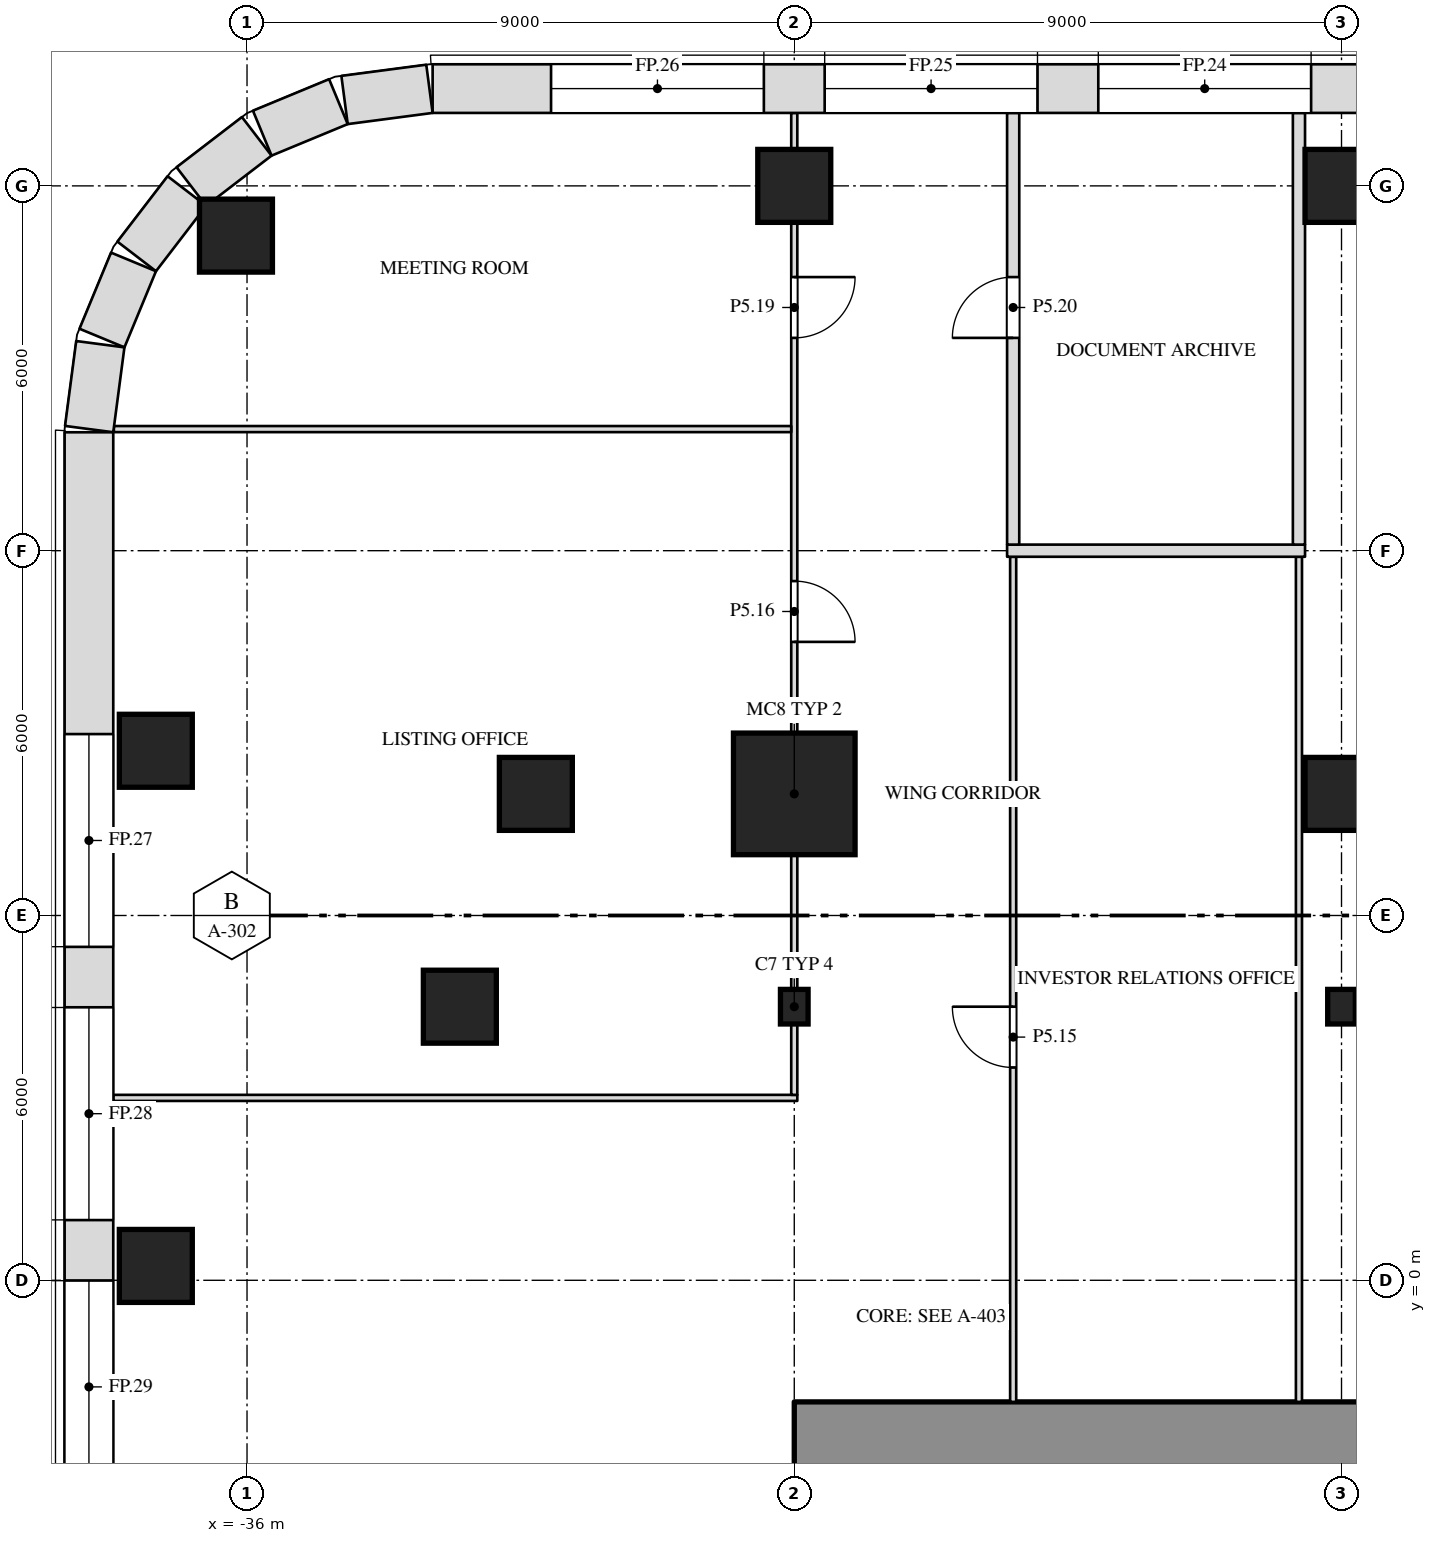
"""IFC4 building model, lengths in metres.
Left out: names, types, materials, properties, quantities, classifications, styles, units other than length and angle.
Written with IfcOpenShell. Run it as: python <this file> out.ifc"""

import sys

from ifc_helpers import new_model, si_unit, direction, frame, frame_2d, origin, origin_2d, place, context, subcontext, project, spatial, rectangle, i_section, extrude, element, fill, save


model = new_model("IFC4")
c1 = context("Model", 3, precision=1e-05, world=origin(), true_north=direction((0.0, 1.0)))
c2 = subcontext(c1, "Body", "Model", "MODEL_VIEW")
j1 = project(units=[si_unit("LENGTHUNIT", "METRE"), si_unit("PLANEANGLEUNIT", "RADIAN")], contexts=[c1])
p1 = place(None, origin())
s1 = spatial("IfcSite", under=j1, at=p1, CompositionType="ELEMENT")
p2 = place(p1, origin())
s2 = spatial("IfcBuilding", under=s1, at=p2, CompositionType="ELEMENT")
p3 = place(p2, frame((0.0, 0.0, 33.0)))
s3 = spatial("IfcBuildingStorey", under=s2, at=p3, CompositionType="ELEMENT", Elevation=33.0)
for number, where, z_axis, x_axis in (
    (1, (-37.5, 0.236, 0.0), (0.0, 0.0, 1.0), (1.0, 0.0, 0.0)),
    (2, (-32.5, 4.5, 0.0), (0.0, 0.0, 1.0), (1.0, 0.0, 0.0)),
):
    element("IfcColumn", number, at=place(p3, frame(where, z_axis=z_axis, x_axis=x_axis)), inside=s3, PredefinedType="COLUMN", context=c2, shape_type="SweptSolid", body=[
        extrude(rectangle(XDim=1.2, YDim=1.2, at=origin_2d()), origin(), (0.0, 0.0, 1.0), 6.0),
    ])
for number, where, z_axis, x_axis in (
    (3, (-27.0, 4.5, 0.0), (0.0, 0.0, 1.0), (1.0, 0.0, 0.0)),
    (4, (-18.0, 4.5, 0.0), (0.0, 0.0, 1.0), (1.0, 0.0, 0.0)),
):
    element("IfcColumn", number, at=place(p3, frame(where, z_axis=z_axis, x_axis=x_axis)), inside=s3, PredefinedType="COLUMN", context=c2, shape_type="SweptSolid", body=[
        extrude(i_section(OverallWidth=0.455, OverallDepth=0.569, WebThickness=0.078, FlangeThickness=0.125, at=origin_2d()), origin(), (0.0, 0.0, 1.0), 6.0),
    ])
p4 = place(p3, frame((-31.25, 8.0, 0.0), z_axis=(0.0, 0.0, 1.0), x_axis=(1.0, 0.0, 0.0)))
e5 = element("IfcColumn", 5, at=p4, inside=s3, PredefinedType="COLUMN", context=c2, shape_type="SweptSolid", body=[
    extrude(rectangle(XDim=1.2, YDim=1.2, at=origin_2d()), origin(), (0.0, 0.0, 1.0), 6.0),
])
p5 = place(p3, frame((-27.0, 8.0, 0.0), z_axis=(0.0, 0.0, 1.0), x_axis=(1.0, 0.0, 0.0)))
e6 = element("IfcColumn", 6, at=p5, inside=s3, PredefinedType="COLUMN", context=c2, shape_type="SweptSolid", body=[
    extrude(rectangle(XDim=2.0, YDim=2.0, at=origin_2d()), origin(), (0.0, 0.0, 1.0), 6.0),
])
for number, where, z_axis, x_axis in (
    (7, (-18.0, 8.0, 0.0), (0.0, 0.0, 1.0), (1.0, 0.0, 0.0)),
    (8, (-37.5, 8.709, 0.0), (0.0, 0.0, 1.0), (1.0, 0.0, 0.0)),
    (9, (-36.182, 17.182, 0.0), (0.0, 0.0, 1.0), (1.0, 0.0, 0.0)),
    (10, (-27.0, 18.0, 0.0), (0.0, 0.0, 1.0), (1.0, 0.0, 0.0)),
    (11, (-18.0, 18.0, 0.0), (0.0, 0.0, 1.0), (1.0, 0.0, 0.0)),
):
    element("IfcColumn", number, at=place(p3, frame(where, z_axis=z_axis, x_axis=x_axis)), inside=s3, PredefinedType="COLUMN", context=c2, shape_type="SweptSolid", body=[
        extrude(rectangle(XDim=1.2, YDim=1.2, at=origin_2d()), origin(), (0.0, 0.0, 1.0), 6.0),
    ])
p6 = place(p3, frame((-27.0, -2.6, 0.0), z_axis=(0.0, 0.0, 1.0), x_axis=(1.0, 0.0, 0.0)))
e12 = element("IfcWall", 12, at=p6, inside=s3, PredefinedType="SHEAR", context=c2, shape_type="SweptSolid", body=[
    extrude(rectangle(XDim=54.0, YDim=1.2, at=frame_2d((27.0, 0.0))), origin(), (0.0, 0.0, 1.0), 5.75),
])
p7 = place(p3, frame((-23.4, -2.0, 0.0), z_axis=(0.0, 0.0, 1.0), x_axis=(0.0, 1.0, 0.0)))
e13 = element("IfcWall", 13, at=p7, inside=s3, PredefinedType="PARTITIONING", context=c2, shape_type="SweptSolid", body=[
    extrude(rectangle(XDim=13.9, YDim=0.1, at=frame_2d((6.95, 0.0))), origin(), (0.0, 0.0, 1.0), 5.75),
])
p8 = place(p7, frame((5.5, 0.0, 0.0)))
e14 = element("IfcOpeningElement", 14, at=p8, cuts=e13, PredefinedType="OPENING", context=c2, shape_type="SweptSolid", body=[
    extrude(rectangle(XDim=1.0, YDim=2.1, at=frame_2d((0.5, 1.05))), frame((0.0, 0.062, 0.0), z_axis=(0.0, -1.0, 0.0), x_axis=(1.0, 0.0, 0.0)), (0.0, 0.0, 1.0), 0.124),
])
p9 = place(p3, frame((-18.7, -2.0, 0.0), z_axis=(0.0, 0.0, 1.0), x_axis=(0.0, 1.0, 0.0)))
e15 = element("IfcWall", 15, at=p9, inside=s3, PredefinedType="PARTITIONING", context=c2, shape_type="SweptSolid", body=[
    extrude(rectangle(XDim=13.9, YDim=0.1, at=frame_2d((6.95, 0.0))), origin(), (0.0, 0.0, 1.0), 5.75),
])
p10 = place(p3, frame((-38.2, 3.0, 0.0), z_axis=(0.0, 0.0, 1.0), x_axis=(1.0, 0.0, 0.0)))
e16 = element("IfcWall", 16, at=p10, inside=s3, PredefinedType="PARTITIONING", context=c2, shape_type="SweptSolid", body=[
    extrude(rectangle(XDim=11.25, YDim=0.1, at=frame_2d((5.625, 0.0))), origin(), (0.0, 0.0, 1.0), 5.75),
])
p11 = place(p3, frame((-27.0, 3.05, 0.0), z_axis=(0.0, 0.0, 1.0), x_axis=(0.0, 1.0, 0.0)))
e17 = element("IfcWall", 17, at=p11, inside=s3, PredefinedType="PARTITIONING", context=c2, shape_type="SweptSolid", body=[
    extrude(rectangle(XDim=1.166, YDim=0.1, at=frame_2d((0.583, 0.0))), origin(), (0.0, 0.0, 1.0), 5.138),
])
p12 = place(p3, frame((-27.0, 4.784, 0.0), z_axis=(0.0, 0.0, 1.0), x_axis=(0.0, 1.0, 0.0)))
e18 = element("IfcWall", 18, at=p12, inside=s3, PredefinedType="PARTITIONING", context=c2, shape_type="SweptSolid", body=[
    extrude(rectangle(XDim=2.216, YDim=0.1, at=frame_2d((1.108, 0.0))), origin(), (0.0, 0.0, 1.0), 5.138),
])
p13 = place(p3, frame((-27.0, 9.0, 0.0), z_axis=(0.0, 0.0, 1.0), x_axis=(0.0, 1.0, 0.0)))
e19 = element("IfcWall", 19, at=p13, inside=s3, PredefinedType="PARTITIONING", context=c2, shape_type="SweptSolid", body=[
    extrude(rectangle(XDim=8.4, YDim=0.1, at=frame_2d((4.2, 0.0))), origin(), (0.0, 0.0, 1.0), 5.138),
])
p14 = place(p13, frame((1.5, 0.0, 0.0)))
e20 = element("IfcOpeningElement", 20, at=p14, cuts=e19, PredefinedType="OPENING", context=c2, shape_type="SweptSolid", body=[
    extrude(rectangle(XDim=1.0, YDim=2.1, at=frame_2d((0.5, 1.05))), frame((0.0, 0.062, 0.0), z_axis=(0.0, -1.0, 0.0), x_axis=(1.0, 0.0, 0.0)), (0.0, 0.0, 1.0), 0.124),
])
p15 = place(p13, frame((6.5, 0.0, 0.0)))
e21 = element("IfcOpeningElement", 21, at=p15, cuts=e19, PredefinedType="OPENING", context=c2, shape_type="SweptSolid", body=[
    extrude(rectangle(XDim=1.0, YDim=2.1, at=frame_2d((0.5, 1.05))), frame((0.0, 0.062, 0.0), z_axis=(0.0, -1.0, 0.0), x_axis=(1.0, 0.0, 0.0)), (0.0, 0.0, 1.0), 0.124),
])
p16 = place(p3, frame((-27.0, 18.6, 0.0), z_axis=(0.0, 0.0, 1.0), x_axis=(0.0, 1.0, 0.0)))
e22 = element("IfcWall", 22, at=p16, inside=s3, PredefinedType="PARTITIONING", context=c2, shape_type="SweptSolid", body=[
    extrude(rectangle(XDim=0.6, YDim=0.1, at=frame_2d((0.3, 0.0))), origin(), (0.0, 0.0, 1.0), 5.75),
])
p17 = place(p3, frame((-23.5, 12.0, 0.0), z_axis=(0.0, 0.0, 1.0), x_axis=(1.0, 0.0, 0.0)))
e23 = element("IfcWall", 23, at=p17, inside=s3, PredefinedType="PARTITIONING", context=c2, shape_type="SweptSolid", body=[
    extrude(rectangle(XDim=4.9, YDim=0.2, at=frame_2d((2.45, 0.0))), origin(), (0.0, 0.0, 1.0), 5.75),
])
p18 = place(p3, frame((-23.4, 12.1, 0.0), z_axis=(0.0, 0.0, 1.0), x_axis=(0.0, 1.0, 0.0)))
e24 = element("IfcWall", 24, at=p18, inside=s3, PredefinedType="PARTITIONING", context=c2, shape_type="SweptSolid", body=[
    extrude(rectangle(XDim=7.1, YDim=0.2, at=frame_2d((3.55, 0.0))), origin(), (0.0, 0.0, 1.0), 5.75),
])
p19 = place(p18, frame((3.4, 0.0, 0.0)))
e25 = element("IfcOpeningElement", 25, at=p19, cuts=e24, PredefinedType="OPENING", context=c2, shape_type="SweptSolid", body=[
    extrude(rectangle(XDim=1.0, YDim=2.1, at=frame_2d((0.5, 1.05))), frame((0.0, 0.112, 0.0), z_axis=(0.0, -1.0, 0.0), x_axis=(1.0, 0.0, 0.0)), (0.0, 0.0, 1.0), 0.224),
])
p20 = place(p3, frame((-18.7, 12.1, 0.0), z_axis=(0.0, 0.0, 1.0), x_axis=(0.0, 1.0, 0.0)))
e26 = element("IfcWall", 26, at=p20, inside=s3, PredefinedType="PARTITIONING", context=c2, shape_type="SweptSolid", body=[
    extrude(rectangle(XDim=7.1, YDim=0.2, at=frame_2d((3.55, 0.0))), origin(), (0.0, 0.0, 1.0), 5.75),
])
p21 = place(p3, frame((-38.19, 14.0, 0.0), z_axis=(0.0, 0.0, 1.0), x_axis=(1.0, 0.0, 0.0)))
e27 = element("IfcWall", 27, at=p21, inside=s3, PredefinedType="PARTITIONING", context=c2, shape_type="SweptSolid", body=[
    extrude(rectangle(XDim=11.14, YDim=0.1, at=frame_2d((5.57, 0.0))), origin(), (0.0, 0.0, 1.0), 5.75),
])
p22 = place(p3, frame((32.948, 19.6, 0.0), z_axis=(0.0, 0.0, 1.0), x_axis=(-1.0, 0.0, 0.0)))
e28 = element("IfcWall", 28, at=p22, inside=s3, PredefinedType="SOLIDWALL", context=c2, shape_type="SweptSolid", body=[
    extrude(rectangle(XDim=65.895, YDim=0.8, at=frame_2d((32.948, 0.0))), origin(), (0.0, 0.0, 1.0), 5.75),
])
p23 = place(p22, frame((1.948, 0.0, 1.0)))
e29 = element("IfcOpeningElement", 29, at=p23, cuts=e28, PredefinedType="OPENING", context=c2, shape_type="SweptSolid", body=[
    extrude(rectangle(XDim=3.5, YDim=4.0, at=frame_2d((1.75, 2.0))), frame((0.0, 0.412, 0.0), z_axis=(0.0, -1.0, 0.0), x_axis=(1.0, 0.0, 0.0)), (0.0, 0.0, 1.0), 0.824),
])
p24 = place(p22, frame((6.448, 0.0, 1.0)))
e30 = element("IfcOpeningElement", 30, at=p24, cuts=e28, PredefinedType="OPENING", context=c2, shape_type="SweptSolid", body=[
    extrude(rectangle(XDim=3.5, YDim=4.0, at=frame_2d((1.75, 2.0))), frame((0.0, 0.412, 0.0), z_axis=(0.0, -1.0, 0.0), x_axis=(1.0, 0.0, 0.0)), (0.0, 0.0, 1.0), 0.824),
])
p25 = place(p22, frame((10.948, 0.0, 1.0)))
e31 = element("IfcOpeningElement", 31, at=p25, cuts=e28, PredefinedType="OPENING", context=c2, shape_type="SweptSolid", body=[
    extrude(rectangle(XDim=3.5, YDim=4.0, at=frame_2d((1.75, 2.0))), frame((0.0, 0.412, 0.0), z_axis=(0.0, -1.0, 0.0), x_axis=(1.0, 0.0, 0.0)), (0.0, 0.0, 1.0), 0.824),
])
p26 = place(p22, frame((51.448, 0.0, 1.0)))
e32 = element("IfcOpeningElement", 32, at=p26, cuts=e28, PredefinedType="OPENING", context=c2, shape_type="SweptSolid", body=[
    extrude(rectangle(XDim=3.5, YDim=4.0, at=frame_2d((1.75, 2.0))), frame((0.0, 0.412, 0.0), z_axis=(0.0, -1.0, 0.0), x_axis=(1.0, 0.0, 0.0)), (0.0, 0.0, 1.0), 0.824),
])
p27 = place(p22, frame((55.948, 0.0, 1.0)))
e33 = element("IfcOpeningElement", 33, at=p27, cuts=e28, PredefinedType="OPENING", context=c2, shape_type="SweptSolid", body=[
    extrude(rectangle(XDim=3.5, YDim=4.0, at=frame_2d((1.75, 2.0))), frame((0.0, 0.412, 0.0), z_axis=(0.0, -1.0, 0.0), x_axis=(1.0, 0.0, 0.0)), (0.0, 0.0, 1.0), 0.824),
])
p28 = place(p22, frame((60.448, 0.0, 1.0)))
e34 = element("IfcOpeningElement", 34, at=p28, cuts=e28, PredefinedType="OPENING", context=c2, shape_type="SweptSolid", body=[
    extrude(rectangle(XDim=3.5, YDim=4.0, at=frame_2d((1.75, 2.0))), frame((0.0, 0.412, 0.0), z_axis=(0.0, -1.0, 0.0), x_axis=(1.0, 0.0, 0.0)), (0.0, 0.0, 1.0), 0.824),
])
p29 = place(p3, frame((-33.0, 19.597, 0.0), z_axis=(0.0, 0.0, 1.0), x_axis=(-0.99144603414, -0.130517283865, 0.0)))
e35 = element("IfcWall", 35, at=p29, inside=s3, PredefinedType="SOLIDWALL", context=c2, shape_type="SweptSolid", body=[
    extrude(rectangle(XDim=1.408, YDim=0.8, at=frame_2d((0.704, 0.0))), origin(), (0.0, 0.0, 1.0), 5.75),
])
p30 = place(p3, frame((-34.497, 19.386, 0.0), z_axis=(0.0, 0.0, 1.0), x_axis=(-0.923847774587, -0.38276009378, 0.0)))
e36 = element("IfcWall", 36, at=p30, inside=s3, PredefinedType="SOLIDWALL", context=c2, shape_type="SweptSolid", body=[
    extrude(rectangle(XDim=1.355, YDim=0.8, at=frame_2d((0.678, 0.0))), origin(), (0.0, 0.0, 1.0), 5.75),
])
for number, where, z_axis, x_axis in (
    (37, (-35.84, 18.815, 0.0), (0.0, 0.0, 1.0), (-0.793, -0.609, 0.0)),
    (38, (-36.989, 17.916, 0.0), (0.0, 0.0, 1.0), (-0.609, -0.793, 0.0)),
):
    element("IfcWall", number, at=place(p3, frame(where, z_axis=z_axis, x_axis=x_axis)), inside=s3, PredefinedType="SOLIDWALL", context=c2, shape_type="SweptSolid", body=[
        extrude(rectangle(XDim=1.356, YDim=0.8, at=frame_2d((0.678, 0.0))), origin(), (0.0, 0.0, 1.0), 5.75),
    ])
p31 = place(p3, frame((-37.867, 16.75, 0.0), z_axis=(0.0, 0.0, 1.0), x_axis=(-0.38276009378, -0.923847774587, 0.0)))
e39 = element("IfcWall", 39, at=p31, inside=s3, PredefinedType="SOLIDWALL", context=c2, shape_type="SweptSolid", body=[
    extrude(rectangle(XDim=1.355, YDim=0.8, at=frame_2d((0.678, 0.0))), origin(), (0.0, 0.0, 1.0), 5.75),
])
p32 = place(p3, frame((-38.413, 15.396, 0.0), z_axis=(0.0, 0.0, 1.0), x_axis=(-0.130517283865, -0.99144603414, 0.0)))
e40 = element("IfcWall", 40, at=p32, inside=s3, PredefinedType="SOLIDWALL", context=c2, shape_type="SweptSolid", body=[
    extrude(rectangle(XDim=1.408, YDim=0.8, at=frame_2d((0.704, 0.0))), origin(), (0.0, 0.0, 1.0), 5.75),
])
p33 = place(p3, frame((-38.6, 13.948, 0.0), z_axis=(0.0, 0.0, 1.0), x_axis=(0.0, -1.0, 0.0)))
e41 = element("IfcWall", 41, at=p33, inside=s3, PredefinedType="SOLIDWALL", context=c2, shape_type="SweptSolid", body=[
    extrude(rectangle(XDim=35.895, YDim=0.8, at=frame_2d((17.948, 0.0))), origin(), (0.0, 0.0, 1.0), 5.75),
])
p34 = place(p33, frame((4.964, 0.0, 1.0)))
e42 = element("IfcOpeningElement", 42, at=p34, cuts=e41, PredefinedType="OPENING", context=c2, shape_type="SweptSolid", body=[
    extrude(rectangle(XDim=3.5, YDim=4.0, at=frame_2d((1.75, 2.0))), frame((0.0, 0.412, 0.0), z_axis=(0.0, -1.0, 0.0), x_axis=(1.0, 0.0, 0.0)), (0.0, 0.0, 1.0), 0.824),
])
p35 = place(p33, frame((9.458, 0.0, 1.0)))
e43 = element("IfcOpeningElement", 43, at=p35, cuts=e41, PredefinedType="OPENING", context=c2, shape_type="SweptSolid", body=[
    extrude(rectangle(XDim=3.5, YDim=4.0, at=frame_2d((1.75, 2.0))), frame((0.0, 0.412, 0.0), z_axis=(0.0, -1.0, 0.0), x_axis=(1.0, 0.0, 0.0)), (0.0, 0.0, 1.0), 0.824),
])
p36 = place(p33, frame((13.951, 0.0, 1.0)))
e44 = element("IfcOpeningElement", 44, at=p36, cuts=e41, PredefinedType="OPENING", context=c2, shape_type="SweptSolid", body=[
    extrude(rectangle(XDim=3.5, YDim=4.0, at=frame_2d((1.75, 2.0))), frame((0.0, 0.412, 0.0), z_axis=(0.0, -1.0, 0.0), x_axis=(1.0, 0.0, 0.0)), (0.0, 0.0, 1.0), 0.824),
])
p37 = place(p33, frame((18.444, 0.0, 1.0)))
e45 = element("IfcOpeningElement", 45, at=p37, cuts=e41, PredefinedType="OPENING", context=c2, shape_type="SweptSolid", body=[
    extrude(rectangle(XDim=3.5, YDim=4.0, at=frame_2d((1.75, 2.0))), frame((0.0, 0.412, 0.0), z_axis=(0.0, -1.0, 0.0), x_axis=(1.0, 0.0, 0.0)), (0.0, 0.0, 1.0), 0.824),
])
p38 = place(p33, frame((22.938, 0.0, 1.0)))
e46 = element("IfcOpeningElement", 46, at=p38, cuts=e41, PredefinedType="OPENING", context=c2, shape_type="SweptSolid", body=[
    extrude(rectangle(XDim=3.5, YDim=4.0, at=frame_2d((1.75, 2.0))), frame((0.0, 0.412, 0.0), z_axis=(0.0, -1.0, 0.0), x_axis=(1.0, 0.0, 0.0)), (0.0, 0.0, 1.0), 0.824),
])
p39 = place(p33, frame((27.431, 0.0, 1.0)))
e47 = element("IfcOpeningElement", 47, at=p39, cuts=e41, PredefinedType="OPENING", context=c2, shape_type="SweptSolid", body=[
    extrude(rectangle(XDim=3.5, YDim=4.0, at=frame_2d((1.75, 2.0))), frame((0.0, 0.412, 0.0), z_axis=(0.0, -1.0, 0.0), x_axis=(1.0, 0.0, 0.0)), (0.0, 0.0, 1.0), 0.824),
])
p40 = place(p8, origin())
e48 = element("IfcDoor", 48, at=p40, inside=s3, OperationType="SINGLE_SWING_RIGHT", PredefinedType="DOOR", context=c2, shape_type="SweptSolid", body=[
    extrude(rectangle(XDim=1.0, YDim=2.1, at=frame_2d((0.5, 1.05))), frame((0.0, 0.025, 0.0), z_axis=(0.0, -1.0, 0.0), x_axis=(1.0, 0.0, 0.0)), (0.0, 0.0, 1.0), 0.05),
])
fill(e14, e48)
p41 = place(p14, origin())
e49 = element("IfcDoor", 49, at=p41, inside=s3, OperationType="SINGLE_SWING_RIGHT", PredefinedType="DOOR", context=c2, shape_type="SweptSolid", body=[
    extrude(rectangle(XDim=1.0, YDim=2.1, at=frame_2d((0.5, 1.05))), frame((0.0, 0.025, 0.0), z_axis=(0.0, -1.0, 0.0), x_axis=(1.0, 0.0, 0.0)), (0.0, 0.0, 1.0), 0.05),
])
fill(e20, e49)
p42 = place(p15, origin())
e50 = element("IfcDoor", 50, at=p42, inside=s3, OperationType="SINGLE_SWING_LEFT", PredefinedType="DOOR", context=c2, shape_type="SweptSolid", body=[
    extrude(rectangle(XDim=1.0, YDim=2.1, at=frame_2d((0.5, 1.05))), frame((0.0, 0.025, 0.0), z_axis=(0.0, -1.0, 0.0), x_axis=(1.0, 0.0, 0.0)), (0.0, 0.0, 1.0), 0.05),
])
fill(e21, e50)
p43 = place(p19, origin())
e51 = element("IfcDoor", 51, at=p43, inside=s3, OperationType="SINGLE_SWING_LEFT", PredefinedType="DOOR", context=c2, shape_type="SweptSolid", body=[
    extrude(rectangle(XDim=1.0, YDim=2.1, at=frame_2d((0.5, 1.05))), frame((0.0, 0.025, 0.0), z_axis=(0.0, -1.0, 0.0), x_axis=(1.0, 0.0, 0.0)), (0.0, 0.0, 1.0), 0.05),
])
fill(e25, e51)
p44 = place(p26, origin())
e52 = element("IfcWindow", 52, at=p44, inside=s3, PartitioningType="SINGLE_PANEL", PredefinedType="WINDOW", context=c2, shape_type="SweptSolid", body=[
    extrude(rectangle(XDim=3.5, YDim=4.0, at=frame_2d((1.75, 2.0))), frame((0.0, 0.03, 0.0), z_axis=(0.0, -1.0, 0.0), x_axis=(1.0, 0.0, 0.0)), (0.0, 0.0, 1.0), 0.06),
])
fill(e32, e52)
p45 = place(p27, origin())
e53 = element("IfcWindow", 53, at=p45, inside=s3, PartitioningType="SINGLE_PANEL", PredefinedType="WINDOW", context=c2, shape_type="SweptSolid", body=[
    extrude(rectangle(XDim=3.5, YDim=4.0, at=frame_2d((1.75, 2.0))), frame((0.0, 0.03, 0.0), z_axis=(0.0, -1.0, 0.0), x_axis=(1.0, 0.0, 0.0)), (0.0, 0.0, 1.0), 0.06),
])
fill(e33, e53)
p46 = place(p28, origin())
e54 = element("IfcWindow", 54, at=p46, inside=s3, PartitioningType="SINGLE_PANEL", PredefinedType="WINDOW", context=c2, shape_type="SweptSolid", body=[
    extrude(rectangle(XDim=3.5, YDim=4.0, at=frame_2d((1.75, 2.0))), frame((0.0, 0.03, 0.0), z_axis=(0.0, -1.0, 0.0), x_axis=(1.0, 0.0, 0.0)), (0.0, 0.0, 1.0), 0.06),
])
fill(e34, e54)
p47 = place(p34, origin())
e55 = element("IfcWindow", 55, at=p47, inside=s3, PartitioningType="SINGLE_PANEL", PredefinedType="WINDOW", context=c2, shape_type="SweptSolid", body=[
    extrude(rectangle(XDim=3.5, YDim=4.0, at=frame_2d((1.75, 2.0))), frame((0.0, 0.03, 0.0), z_axis=(0.0, -1.0, 0.0), x_axis=(1.0, 0.0, 0.0)), (0.0, 0.0, 1.0), 0.06),
])
fill(e42, e55)
p48 = place(p35, origin())
e56 = element("IfcWindow", 56, at=p48, inside=s3, PartitioningType="SINGLE_PANEL", PredefinedType="WINDOW", context=c2, shape_type="SweptSolid", body=[
    extrude(rectangle(XDim=3.5, YDim=4.0, at=frame_2d((1.75, 2.0))), frame((0.0, 0.03, 0.0), z_axis=(0.0, -1.0, 0.0), x_axis=(1.0, 0.0, 0.0)), (0.0, 0.0, 1.0), 0.06),
])
fill(e43, e56)
p49 = place(p36, origin())
e57 = element("IfcWindow", 57, at=p49, inside=s3, PartitioningType="SINGLE_PANEL", PredefinedType="WINDOW", context=c2, shape_type="SweptSolid", body=[
    extrude(rectangle(XDim=3.5, YDim=4.0, at=frame_2d((1.75, 2.0))), frame((0.0, 0.03, 0.0), z_axis=(0.0, -1.0, 0.0), x_axis=(1.0, 0.0, 0.0)), (0.0, 0.0, 1.0), 0.06),
])
fill(e44, e57)
save(model, sys.argv[1])
